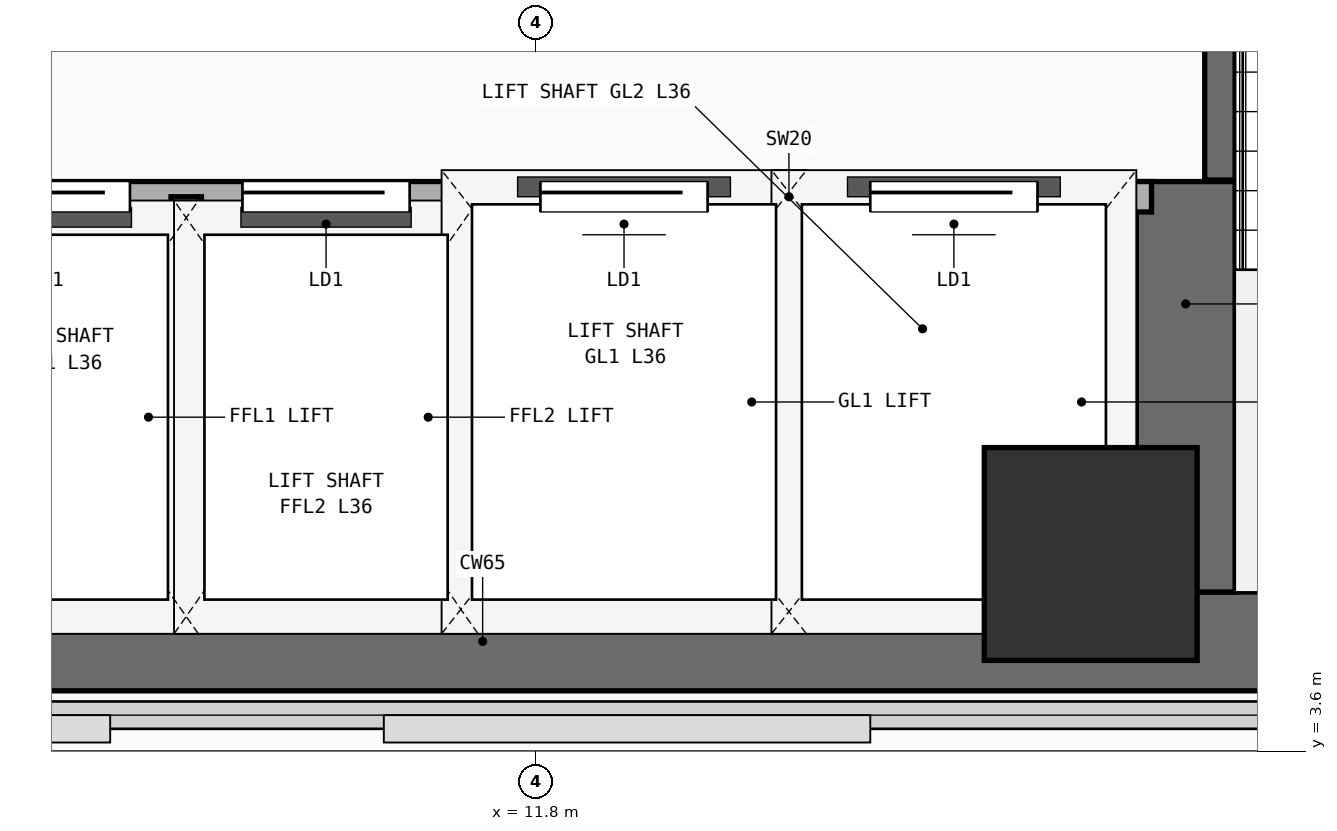
"""IFC4 building model, lengths in metres.
Left out: names, types, materials, properties, quantities, classifications, styles, units other than length and angle.
Written with IfcOpenShell. Run it as: python <this file> out.ifc"""

import sys

from ifc_helpers import new_model, si_unit, direction, frame, frame_2d, origin, origin_2d, place, context, subcontext, project, spatial, rectangle, extrude, element, fill, save


model = new_model("IFC4")
c1 = context("Model", 3, precision=1e-05, world=origin(), true_north=direction((0.0, 1.0)))
c2 = subcontext(c1, "Body", "Model", "MODEL_VIEW")
j1 = project(units=[si_unit("LENGTHUNIT", "METRE"), si_unit("PLANEANGLEUNIT", "RADIAN")], contexts=[c1])
p1 = place(None, origin())
s1 = spatial("IfcSite", under=j1, at=p1, CompositionType="ELEMENT")
p2 = place(p1, origin())
s2 = spatial("IfcBuilding", under=s1, at=p2, CompositionType="ELEMENT")
p3 = place(p2, frame((0.0, 0.0, 141.1)))
s3 = spatial("IfcBuildingStorey", under=s2, at=p3, CompositionType="ELEMENT", Elevation=141.1)
p4 = place(p3, frame((7.125, 4.325, 0.0), z_axis=(0.0, 0.0, 1.0), x_axis=(1.0, 0.0, 0.0)))
e1 = element("IfcWall", 1, at=p4, inside=s3, PredefinedType="SHEAR", context=c2, shape_type="SweptSolid", body=[
    extrude(rectangle(XDim=14.0, YDim=0.65, at=frame_2d((7.0, 0.0))), origin(), (0.0, 0.0, 1.0), 4.86),
])
p5 = place(p3, frame((16.075, 4.65, 0.0), z_axis=(0.0, 0.0, 1.0), x_axis=(0.0, 1.0, 0.0)))
e2 = element("IfcWall", 2, at=p5, inside=s3, PredefinedType="SHEAR", context=c2, shape_type="SweptSolid", body=[
    extrude(rectangle(XDim=2.7, YDim=0.65, at=frame_2d((1.35, 0.0))), origin(), (0.0, 0.0, 1.0), 4.86),
])
p6 = place(p3, frame((15.45, 4.9, 0.0), z_axis=(0.0, 0.0, 1.0), x_axis=(1.0, 0.0, 0.0)))
e3 = element("IfcColumn", 3, at=p6, inside=s3, PredefinedType="COLUMN", context=c2, shape_type="SweptSolid", body=[
    extrude(rectangle(XDim=1.4, YDim=1.4, at=origin_2d()), origin(), (0.0, 0.0, 1.0), 4.86),
])
p7 = place(p3, frame((16.3, 7.36, 0.0), z_axis=(0.0, 0.0, 1.0), x_axis=(0.0, 1.0, 0.0)))
e4 = element("IfcWall", 4, at=p7, inside=s3, PredefinedType="SHEAR", context=c2, shape_type="SweptSolid", body=[
    extrude(rectangle(XDim=2.58, YDim=0.2, at=frame_2d((1.29, 0.0))), origin(), (0.0, 0.0, 1.0), 4.86),
])
p8 = place(p3, frame((7.5, 7.25, 0.0), z_axis=(0.0, 0.0, 1.0), x_axis=(1.0, 0.0, 0.0)))
e5 = element("IfcWall", 5, at=p8, inside=s3, PredefinedType="PARTITIONING", context=c2, shape_type="SweptSolid", body=[
    extrude(rectangle(XDim=8.35, YDim=0.2, at=frame_2d((4.175, 0.0))), origin(), (0.0, 0.0, 1.0), 4.86),
])
p9 = place(p8, frame((0.53, 0.0, 0.0)))
e6 = element("IfcOpeningElement", 6, at=p9, cuts=e5, PredefinedType="OPENING", context=c2, shape_type="SweptSolid", body=[
    extrude(rectangle(XDim=1.1, YDim=2.2, at=frame_2d((0.55, 1.1))), frame((0.0, 0.11, 0.0), z_axis=(0.0, -1.0, 0.0), x_axis=(1.0, 0.0, 0.0)), (0.0, 0.0, 1.0), 0.22),
])
p10 = place(p8, frame((2.37, 0.0, 0.0)))
e7 = element("IfcOpeningElement", 7, at=p10, cuts=e5, PredefinedType="OPENING", context=c2, shape_type="SweptSolid", body=[
    extrude(rectangle(XDim=1.1, YDim=2.2, at=frame_2d((0.55, 1.1))), frame((0.0, 0.11, 0.0), z_axis=(0.0, -1.0, 0.0), x_axis=(1.0, 0.0, 0.0)), (0.0, 0.0, 1.0), 0.22),
])
p11 = place(p8, frame((4.33, 0.0, 0.0)))
e8 = element("IfcOpeningElement", 8, at=p11, cuts=e5, PredefinedType="OPENING", context=c2, shape_type="SweptSolid", body=[
    extrude(rectangle(XDim=1.1, YDim=2.2, at=frame_2d((0.55, 1.1))), frame((0.0, 0.11, 0.0), z_axis=(0.0, -1.0, 0.0), x_axis=(1.0, 0.0, 0.0)), (0.0, 0.0, 1.0), 0.22),
])
p12 = place(p8, frame((6.5, 0.0, 0.0)))
e9 = element("IfcOpeningElement", 9, at=p12, cuts=e5, PredefinedType="OPENING", context=c2, shape_type="SweptSolid", body=[
    extrude(rectangle(XDim=1.1, YDim=2.2, at=frame_2d((0.55, 1.1))), frame((0.0, 0.11, 0.0), z_axis=(0.0, -1.0, 0.0), x_axis=(1.0, 0.0, 0.0)), (0.0, 0.0, 1.0), 0.22),
])
for number, where, z_axis, x_axis in (
    (10, (9.5, 4.45, 0.0), (0.0, 0.0, 1.0), (0.0, 1.0, 0.0)),
    (11, (11.36, 4.45, 0.0), (0.0, 0.0, 1.0), (0.0, 1.0, 0.0)),
    (12, (13.46, 4.45, 0.0), (0.0, 0.0, 1.0), (0.0, 1.0, 0.0)),
):
    element("IfcWall", number, at=place(p3, frame(where, z_axis=z_axis, x_axis=x_axis)), inside=s3, PredefinedType="PARTITIONING", context=c2, shape_type="SweptSolid", body=[
        extrude(rectangle(XDim=2.8, YDim=0.2, at=frame_2d((1.4, 0.0))), origin(), (0.0, 0.0, 1.0), 4.86),
    ])
p13 = place(p9, origin())
e13 = element("IfcDoor", 13, at=p13, inside=s3, OperationType="SLIDING_TO_LEFT", PredefinedType="DOOR", context=c2, shape_type="SweptSolid", body=[
    extrude(rectangle(XDim=1.1, YDim=2.2, at=frame_2d((0.55, 1.1))), frame((0.0, 0.025, 0.0), z_axis=(0.0, -1.0, 0.0), x_axis=(1.0, 0.0, 0.0)), (0.0, 0.0, 1.0), 0.05),
])
fill(e6, e13)
p14 = place(p10, origin())
e14 = element("IfcDoor", 14, at=p14, inside=s3, OperationType="SLIDING_TO_LEFT", PredefinedType="DOOR", context=c2, shape_type="SweptSolid", body=[
    extrude(rectangle(XDim=1.1, YDim=2.2, at=frame_2d((0.55, 1.1))), frame((0.0, 0.025, 0.0), z_axis=(0.0, -1.0, 0.0), x_axis=(1.0, 0.0, 0.0)), (0.0, 0.0, 1.0), 0.05),
])
fill(e7, e14)
p15 = place(p11, origin())
e15 = element("IfcDoor", 15, at=p15, inside=s3, OperationType="SLIDING_TO_LEFT", PredefinedType="DOOR", context=c2, shape_type="SweptSolid", body=[
    extrude(rectangle(XDim=1.1, YDim=2.2, at=frame_2d((0.55, 1.1))), frame((0.0, 0.025, 0.0), z_axis=(0.0, -1.0, 0.0), x_axis=(1.0, 0.0, 0.0)), (0.0, 0.0, 1.0), 0.05),
])
fill(e8, e15)
p16 = place(p12, origin())
e16 = element("IfcDoor", 16, at=p16, inside=s3, OperationType="SLIDING_TO_LEFT", PredefinedType="DOOR", context=c2, shape_type="SweptSolid", body=[
    extrude(rectangle(XDim=1.1, YDim=2.2, at=frame_2d((0.55, 1.1))), frame((0.0, 0.025, 0.0), z_axis=(0.0, -1.0, 0.0), x_axis=(1.0, 0.0, 0.0)), (0.0, 0.0, 1.0), 0.05),
])
fill(e9, e16)
save(model, sys.argv[1])
